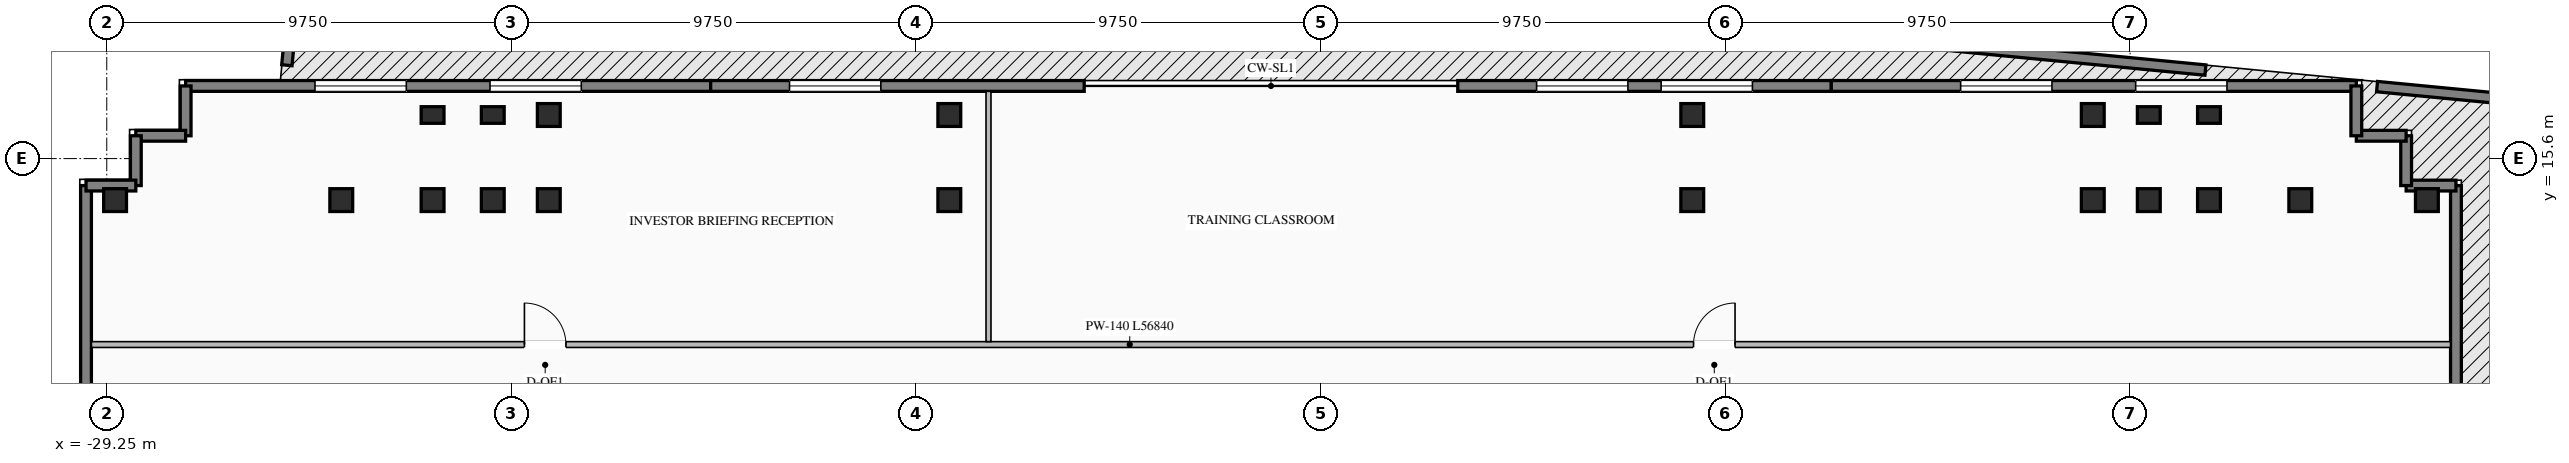
"""IFC4 building model, lengths in metres.
Left out: names, types, materials, properties, quantities, classifications, styles, units other than length and angle.
Written with IfcOpenShell. Run it as: python <this file> out.ifc"""

import sys

from ifc_helpers import new_model, si_unit, direction, frame, frame_2d, origin, origin_2d, place, context, subcontext, project, spatial, rectangle, i_section, extrude, element, fill, save


model = new_model("IFC4")
c1 = context("Model", 3, precision=1e-05, world=origin(), true_north=direction((0.0, 1.0)))
c2 = subcontext(c1, "Body", "Model", "MODEL_VIEW")
j1 = project(units=[si_unit("LENGTHUNIT", "METRE"), si_unit("PLANEANGLEUNIT", "RADIAN")], contexts=[c1])
p1 = place(None, origin())
s1 = spatial("IfcSite", under=j1, at=p1, CompositionType="ELEMENT")
p2 = place(p1, origin())
s2 = spatial("IfcBuilding", under=s1, at=p2, CompositionType="ELEMENT")
p3 = place(p2, frame((0.0, 0.0, 204.3)))
s3 = spatial("IfcBuildingStorey", under=s2, at=p3, CompositionType="ELEMENT", Elevation=204.3)
for number, where, z_axis, x_axis in (
    (1, (-21.4, 14.6, 0.0), (0.0, 0.0, 1.0), (1.0, 0.0, 0.0)),
    (2, (-19.95, 14.6, 0.0), (0.0, 0.0, 1.0), (1.0, 0.0, 0.0)),
    (3, (-18.6, 14.6, 0.0), (0.0, 0.0, 1.0), (1.0, 0.0, 0.0)),
    (4, (-8.95, 14.6, 0.0), (0.0, 0.0, 1.0), (1.0, 0.0, 0.0)),
    (5, (8.95, 14.6, 0.0), (0.0, 0.0, 1.0), (1.0, 0.0, 0.0)),
    (6, (18.6, 14.6, 0.0), (0.0, 0.0, 1.0), (1.0, 0.0, 0.0)),
    (7, (19.95, 14.6, 0.0), (0.0, 0.0, 1.0), (1.0, 0.0, 0.0)),
    (8, (21.4, 14.6, 0.0), (0.0, 0.0, 1.0), (1.0, 0.0, 0.0)),
    (9, (-23.6, 14.6, 0.0), (0.0, 0.0, 1.0), (1.0, 0.0, 0.0)),
    (10, (23.6, 14.6, 0.0), (0.0, 0.0, 1.0), (1.0, 0.0, 0.0)),
):
    element("IfcColumn", number, at=place(p3, frame(where, z_axis=z_axis, x_axis=x_axis)), inside=s3, PredefinedType="COLUMN", context=c2, shape_type="SweptSolid", body=[
        extrude(i_section(OverallWidth=0.55, OverallDepth=0.55, WebThickness=0.024, FlangeThickness=0.036, at=origin_2d()), origin(), (0.0, 0.0, 1.0), 4.2),
    ])
for number, where, z_axis, x_axis in (
    (11, (-18.6, 16.65, -0.28), (0.0, 0.0, 1.0), (1.0, 0.0, 0.0)),
    (12, (-8.95, 16.65, -0.28), (0.0, 0.0, 1.0), (1.0, 0.0, 0.0)),
    (13, (8.95, 16.65, -0.28), (0.0, 0.0, 1.0), (1.0, 0.0, 0.0)),
):
    element("IfcColumn", number, at=place(p3, frame(where, z_axis=z_axis, x_axis=x_axis)), inside=s3, PredefinedType="COLUMN", context=c2, shape_type="SweptSolid", body=[
        extrude(i_section(OverallWidth=0.55, OverallDepth=0.55, WebThickness=0.024, FlangeThickness=0.036, at=origin_2d()), origin(), (0.0, 0.0, 1.0), 4.48),
    ])
p4 = place(p3, frame((18.6, 16.65, 0.0), z_axis=(0.0, 0.0, 1.0), x_axis=(1.0, 0.0, 0.0)))
e14 = element("IfcColumn", 14, at=p4, inside=s3, PredefinedType="COLUMN", context=c2, shape_type="SweptSolid", body=[
    extrude(i_section(OverallWidth=0.55, OverallDepth=0.55, WebThickness=0.024, FlangeThickness=0.036, at=origin_2d()), origin(), (0.0, 0.0, 1.0), 4.2),
])
for number, where, z_axis, x_axis in (
    (15, (-29.05, 14.6, -0.28), (0.0, 0.0, 1.0), (1.0, 0.0, 0.0)),
    (16, (26.65, 14.6, -0.28), (0.0, 0.0, 1.0), (1.0, 0.0, 0.0)),
):
    element("IfcColumn", number, at=place(p3, frame(where, z_axis=z_axis, x_axis=x_axis)), inside=s3, PredefinedType="COLUMN", context=c2, shape_type="SweptSolid", body=[
        extrude(i_section(OverallWidth=0.55, OverallDepth=0.55, WebThickness=0.024, FlangeThickness=0.036, at=origin_2d()), origin(), (0.0, 0.0, 1.0), 4.48),
    ])
for number, where, z_axis, x_axis in (
    (17, (-21.4, 16.65, -0.28), (0.0, 0.0, 1.0), (1.0, 0.0, 0.0)),
    (18, (-19.95, 16.65, -0.28), (0.0, 0.0, 1.0), (1.0, 0.0, 0.0)),
):
    element("IfcColumn", number, at=place(p3, frame(where, z_axis=z_axis, x_axis=x_axis)), inside=s3, PredefinedType="PILASTER", context=c2, shape_type="SweptSolid", body=[
        extrude(rectangle(XDim=0.55, YDim=0.4, at=origin_2d()), origin(), (0.0, 0.0, 1.0), 4.48),
    ])
for number, where, z_axis, x_axis in (
    (19, (19.95, 16.65, 0.0), (0.0, 0.0, 1.0), (1.0, 0.0, 0.0)),
    (20, (21.4, 16.65, 0.0), (0.0, 0.0, 1.0), (1.0, 0.0, 0.0)),
):
    element("IfcColumn", number, at=place(p3, frame(where, z_axis=z_axis, x_axis=x_axis)), inside=s3, PredefinedType="PILASTER", context=c2, shape_type="SweptSolid", body=[
        extrude(rectangle(XDim=0.55, YDim=0.4, at=origin_2d()), origin(), (0.0, 0.0, 1.0), 4.2),
    ])
p5 = place(p3, frame((-27.35, 17.35, 0.0), z_axis=(0.0, 0.0, 1.0), x_axis=(1.0, 0.0, 0.0)))
e21 = element("IfcWall", 21, at=p5, inside=s3, PredefinedType="STANDARD", context=c2, shape_type="SweptSolid", body=[
    extrude(rectangle(XDim=12.65, YDim=0.26, at=frame_2d((6.325, 0.0))), origin(), (0.0, 0.0, 1.0), 4.0),
])
p6 = place(p5, frame((3.117, 0.0, 0.76)))
e22 = element("IfcOpeningElement", 22, at=p6, cuts=e21, PredefinedType="OPENING", context=c2, shape_type="SweptSolid", body=[
    extrude(rectangle(XDim=2.2, YDim=2.25, at=frame_2d((1.1, 1.125))), frame((0.0, 0.14, 0.0), z_axis=(0.0, -1.0, 0.0), x_axis=(1.0, 0.0, 0.0)), (0.0, 0.0, 1.0), 0.28),
])
p7 = place(p5, frame((7.333, 0.0, 0.76)))
e23 = element("IfcOpeningElement", 23, at=p7, cuts=e21, PredefinedType="OPENING", context=c2, shape_type="SweptSolid", body=[
    extrude(rectangle(XDim=2.2, YDim=2.25, at=frame_2d((1.1, 1.125))), frame((0.0, 0.14, 0.0), z_axis=(0.0, -1.0, 0.0), x_axis=(1.0, 0.0, 0.0)), (0.0, 0.0, 1.0), 0.28),
])
p8 = place(p3, frame((-14.7, 17.35, 0.0), z_axis=(0.0, 0.0, 1.0), x_axis=(1.0, 0.0, 0.0)))
e24 = element("IfcWall", 24, at=p8, inside=s3, PredefinedType="STANDARD", context=c2, shape_type="SweptSolid", body=[
    extrude(rectangle(XDim=9.0, YDim=0.26, at=frame_2d((4.5, 0.0))), origin(), (0.0, 0.0, 1.0), 4.0),
])
p9 = place(p8, frame((1.9, 0.0, 0.76)))
e25 = element("IfcOpeningElement", 25, at=p9, cuts=e24, PredefinedType="OPENING", context=c2, shape_type="SweptSolid", body=[
    extrude(rectangle(XDim=2.2, YDim=2.25, at=frame_2d((1.1, 1.125))), frame((0.0, 0.14, 0.0), z_axis=(0.0, -1.0, 0.0), x_axis=(1.0, 0.0, 0.0)), (0.0, 0.0, 1.0), 0.28),
])
p10 = place(p3, frame((3.3, 17.35, 0.0), z_axis=(0.0, 0.0, 1.0), x_axis=(1.0, 0.0, 0.0)))
e26 = element("IfcWall", 26, at=p10, inside=s3, PredefinedType="STANDARD", context=c2, shape_type="SweptSolid", body=[
    extrude(rectangle(XDim=9.0, YDim=0.26, at=frame_2d((4.5, 0.0))), origin(), (0.0, 0.0, 1.0), 4.0),
])
p11 = place(p10, frame((1.9, 0.0, 0.76)))
e27 = element("IfcOpeningElement", 27, at=p11, cuts=e26, PredefinedType="OPENING", context=c2, shape_type="SweptSolid", body=[
    extrude(rectangle(XDim=2.2, YDim=2.25, at=frame_2d((1.1, 1.125))), frame((0.0, 0.14, 0.0), z_axis=(0.0, -1.0, 0.0), x_axis=(1.0, 0.0, 0.0)), (0.0, 0.0, 1.0), 0.28),
])
p12 = place(p10, frame((4.9, 0.0, 0.76)))
e28 = element("IfcOpeningElement", 28, at=p12, cuts=e26, PredefinedType="OPENING", context=c2, shape_type="SweptSolid", body=[
    extrude(rectangle(XDim=2.2, YDim=2.25, at=frame_2d((1.1, 1.125))), frame((0.0, 0.14, 0.0), z_axis=(0.0, -1.0, 0.0), x_axis=(1.0, 0.0, 0.0)), (0.0, 0.0, 1.0), 0.28),
])
p13 = place(p3, frame((12.3, 17.35, 0.0), z_axis=(0.0, 0.0, 1.0), x_axis=(1.0, 0.0, 0.0)))
e29 = element("IfcWall", 29, at=p13, inside=s3, PredefinedType="STANDARD", context=c2, shape_type="SweptSolid", body=[
    extrude(rectangle(XDim=12.65, YDim=0.26, at=frame_2d((6.325, 0.0))), origin(), (0.0, 0.0, 1.0), 4.0),
])
p14 = place(p13, frame((3.117, 0.0, 0.76)))
e30 = element("IfcOpeningElement", 30, at=p14, cuts=e29, PredefinedType="OPENING", context=c2, shape_type="SweptSolid", body=[
    extrude(rectangle(XDim=2.2, YDim=2.25, at=frame_2d((1.1, 1.125))), frame((0.0, 0.14, 0.0), z_axis=(0.0, -1.0, 0.0), x_axis=(1.0, 0.0, 0.0)), (0.0, 0.0, 1.0), 0.28),
])
p15 = place(p13, frame((7.333, 0.0, 0.76)))
e31 = element("IfcOpeningElement", 31, at=p15, cuts=e29, PredefinedType="OPENING", context=c2, shape_type="SweptSolid", body=[
    extrude(rectangle(XDim=2.2, YDim=2.25, at=frame_2d((1.1, 1.125))), frame((0.0, 0.14, 0.0), z_axis=(0.0, -1.0, 0.0), x_axis=(1.0, 0.0, 0.0)), (0.0, 0.0, 1.0), 0.28),
])
p16 = place(p3, frame((-29.75, -0.9, 0.0), z_axis=(0.0, 0.0, 1.0), x_axis=(0.0, 1.0, 0.0)))
e32 = element("IfcWall", 32, at=p16, inside=s3, PredefinedType="STANDARD", context=c2, shape_type="SweptSolid", body=[
    extrude(rectangle(XDim=15.85, YDim=0.26, at=frame_2d((7.925, 0.0))), origin(), (0.0, 0.0, 1.0), 4.0),
])
p17 = place(p16, frame((4.283, 0.0, 0.76)))
e33 = element("IfcOpeningElement", 33, at=p17, cuts=e32, PredefinedType="OPENING", context=c2, shape_type="SweptSolid", body=[
    extrude(rectangle(XDim=2.0, YDim=2.05, at=frame_2d((1.0, 1.025))), frame((0.0, 0.14, 0.0), z_axis=(0.0, -1.0, 0.0), x_axis=(1.0, 0.0, 0.0)), (0.0, 0.0, 1.0), 0.28),
])
p18 = place(p3, frame((27.35, 14.95, 0.0), z_axis=(0.0, 0.0, 1.0), x_axis=(0.0, -1.0, 0.0)))
e34 = element("IfcWall", 34, at=p18, inside=s3, PredefinedType="STANDARD", context=c2, shape_type="SweptSolid", body=[
    extrude(rectangle(XDim=15.85, YDim=0.26, at=frame_2d((7.925, 0.0))), origin(), (0.0, 0.0, 1.0), 4.0),
])
p19 = place(p18, frame((9.567, 0.0, 0.76)))
e35 = element("IfcOpeningElement", 35, at=p19, cuts=e34, PredefinedType="OPENING", context=c2, shape_type="SweptSolid", body=[
    extrude(rectangle(XDim=2.0, YDim=2.05, at=frame_2d((1.0, 1.025))), frame((0.0, 0.14, 0.0), z_axis=(0.0, -1.0, 0.0), x_axis=(1.0, 0.0, 0.0)), (0.0, 0.0, 1.0), 0.28),
])
p20 = place(p3, frame((27.35, 14.95, 0.0), z_axis=(0.0, 0.0, 1.0), x_axis=(-1.0, 0.0, 0.0)))
e36 = element("IfcWall", 36, at=p20, inside=s3, PredefinedType="STANDARD", context=c2, shape_type="SweptSolid", body=[
    extrude(rectangle(XDim=1.2, YDim=0.26, at=frame_2d((0.6, 0.0))), origin(), (0.0, 0.0, 1.0), 2.195),
])
for number, where, z_axis, x_axis in (
    (37, (26.15, 14.95, 0.0), (0.0, 0.0, 1.0), (0.0, 1.0, 0.0)),
    (38, (26.15, 16.15, 0.0), (0.0, 0.0, 1.0), (-1.0, 0.0, 0.0)),
):
    element("IfcWall", number, at=place(p3, frame(where, z_axis=z_axis, x_axis=x_axis)), inside=s3, PredefinedType="STANDARD", context=c2, shape_type="SweptSolid", body=[
        extrude(rectangle(XDim=1.2, YDim=0.26, at=frame_2d((0.6, 0.0))), origin(), (0.0, 0.0, 1.0), 2.195),
    ])
for number, where, z_axis, x_axis in (
    (39, (24.95, 16.15, 0.0), (0.0, 0.0, 1.0), (0.0, 1.0, 0.0)),
    (40, (-27.35, 17.35, 0.0), (0.0, 0.0, 1.0), (0.0, -1.0, 0.0)),
):
    element("IfcWall", number, at=place(p3, frame(where, z_axis=z_axis, x_axis=x_axis)), inside=s3, PredefinedType="STANDARD", context=c2, shape_type="SweptSolid", body=[
        extrude(rectangle(XDim=1.2, YDim=0.26, at=frame_2d((0.6, 0.0))), origin(), (0.0, 0.0, 1.0), 2.195),
    ])
for number, where, z_axis, x_axis in (
    (41, (-27.35, 16.15, 0.0), (0.0, 0.0, 1.0), (-1.0, 0.0, 0.0)),
    (42, (-28.55, 16.15, 0.0), (0.0, 0.0, 1.0), (0.0, -1.0, 0.0)),
    (43, (-28.55, 14.95, 0.0), (0.0, 0.0, 1.0), (-1.0, 0.0, 0.0)),
):
    element("IfcWall", number, at=place(p3, frame(where, z_axis=z_axis, x_axis=x_axis)), inside=s3, PredefinedType="STANDARD", context=c2, shape_type="SweptSolid", body=[
        extrude(rectangle(XDim=1.2, YDim=0.26, at=frame_2d((0.6, 0.0))), origin(), (0.0, 0.0, 1.0), 2.195),
    ])
p21 = place(p3, frame((-21.979, 21.901, 0.0), z_axis=(0.0, 0.0, 1.0), x_axis=(0.99539621615, -0.095845567841, 0.0)))
e44 = element("IfcWall", 44, at=p21, inside=s3, PredefinedType="PARAPET", context=c2, shape_type="SweptSolid", body=[
    extrude(rectangle(XDim=43.494, YDim=0.25, at=frame_2d((21.747, 0.0))), origin(), (0.0, 0.0, 1.0), 1.2),
])
p22 = place(p3, frame((-24.911, 17.849, 0.0), z_axis=(0.0, 0.0, 1.0), x_axis=(0.095777585134, 0.995402759784, 0.0)))
e45 = element("IfcWall", 45, at=p22, inside=s3, PredefinedType="PARAPET", context=c2, shape_type="SweptSolid", body=[
    extrude(rectangle(XDim=1.784, YDim=0.25, at=frame_2d((0.892, 0.0))), origin(), (0.0, 0.0, 1.0), 1.2),
])
p23 = place(p3, frame((25.449, 17.334, 0.0), z_axis=(0.0, 0.0, 1.0), x_axis=(0.995397970868, -0.095827342607, 0.0)))
e46 = element("IfcWall", 46, at=p23, inside=s3, PredefinedType="PARAPET", context=c2, shape_type="SweptSolid", body=[
    extrude(rectangle(XDim=7.852, YDim=0.25, at=frame_2d((3.926, 0.0))), origin(), (0.0, 0.0, 1.0), 1.2),
])
p24 = place(p3, frame((-29.62, 11.12, 0.0), z_axis=(0.0, 0.0, 1.0), x_axis=(1.0, 0.0, 0.0)))
e47 = element("IfcWall", 47, at=p24, inside=s3, PredefinedType="STANDARD", context=c2, shape_type="SweptSolid", body=[
    extrude(rectangle(XDim=56.84, YDim=0.14, at=frame_2d((28.42, 0.0))), origin(), (0.0, 0.0, 1.0), 4.0),
])
p25 = place(p24, frame((10.433, 0.0, 0.0)))
e48 = element("IfcOpeningElement", 48, at=p25, cuts=e47, PredefinedType="OPENING", context=c2, shape_type="SweptSolid", body=[
    extrude(rectangle(XDim=1.0, YDim=2.08, at=frame_2d((0.5, 1.04))), frame((0.0, 0.08, 0.0), z_axis=(0.0, -1.0, 0.0), x_axis=(1.0, 0.0, 0.0)), (0.0, 0.0, 1.0), 0.16),
])
p26 = place(p24, frame((38.601, 0.0, 0.0)))
e49 = element("IfcOpeningElement", 49, at=p26, cuts=e47, PredefinedType="OPENING", context=c2, shape_type="SweptSolid", body=[
    extrude(rectangle(XDim=1.0, YDim=2.08, at=frame_2d((0.5, 1.04))), frame((0.0, 0.08, 0.0), z_axis=(0.0, -1.0, 0.0), x_axis=(1.0, 0.0, 0.0)), (0.0, 0.0, 1.0), 0.16),
])
p27 = place(p3, frame((-8.006, 11.19, 0.0), z_axis=(0.0, 0.0, 1.0), x_axis=(0.0, 1.0, 0.0)))
e50 = element("IfcWall", 50, at=p27, inside=s3, PredefinedType="STANDARD", context=c2, shape_type="SweptSolid", body=[
    extrude(rectangle(XDim=6.03, YDim=0.12, at=frame_2d((3.015, 0.0))), origin(), (0.0, 0.0, 1.0), 4.0),
])
p28 = place(p6, origin())
e51 = element("IfcWindow", 51, at=p28, inside=s3, PartitioningType="DOUBLE_PANEL_VERTICAL", PredefinedType="WINDOW", context=c2, shape_type="SweptSolid", body=[
    extrude(rectangle(XDim=2.2, YDim=2.25, at=frame_2d((1.1, 1.125))), frame((0.0, 0.03, 0.0), z_axis=(0.0, -1.0, 0.0), x_axis=(1.0, 0.0, 0.0)), (0.0, 0.0, 1.0), 0.06),
])
fill(e22, e51)
p29 = place(p7, origin())
e52 = element("IfcWindow", 52, at=p29, inside=s3, PartitioningType="DOUBLE_PANEL_VERTICAL", PredefinedType="WINDOW", context=c2, shape_type="SweptSolid", body=[
    extrude(rectangle(XDim=2.2, YDim=2.25, at=frame_2d((1.1, 1.125))), frame((0.0, 0.03, 0.0), z_axis=(0.0, -1.0, 0.0), x_axis=(1.0, 0.0, 0.0)), (0.0, 0.0, 1.0), 0.06),
])
fill(e23, e52)
p30 = place(p9, origin())
e53 = element("IfcWindow", 53, at=p30, inside=s3, PartitioningType="DOUBLE_PANEL_VERTICAL", PredefinedType="WINDOW", context=c2, shape_type="SweptSolid", body=[
    extrude(rectangle(XDim=2.2, YDim=2.25, at=frame_2d((1.1, 1.125))), frame((0.0, 0.03, 0.0), z_axis=(0.0, -1.0, 0.0), x_axis=(1.0, 0.0, 0.0)), (0.0, 0.0, 1.0), 0.06),
])
fill(e25, e53)
p31 = place(p11, origin())
e54 = element("IfcWindow", 54, at=p31, inside=s3, PartitioningType="DOUBLE_PANEL_VERTICAL", PredefinedType="WINDOW", context=c2, shape_type="SweptSolid", body=[
    extrude(rectangle(XDim=2.2, YDim=2.25, at=frame_2d((1.1, 1.125))), frame((0.0, 0.03, 0.0), z_axis=(0.0, -1.0, 0.0), x_axis=(1.0, 0.0, 0.0)), (0.0, 0.0, 1.0), 0.06),
])
fill(e27, e54)
p32 = place(p12, origin())
e55 = element("IfcWindow", 55, at=p32, inside=s3, PartitioningType="DOUBLE_PANEL_VERTICAL", PredefinedType="WINDOW", context=c2, shape_type="SweptSolid", body=[
    extrude(rectangle(XDim=2.2, YDim=2.25, at=frame_2d((1.1, 1.125))), frame((0.0, 0.03, 0.0), z_axis=(0.0, -1.0, 0.0), x_axis=(1.0, 0.0, 0.0)), (0.0, 0.0, 1.0), 0.06),
])
fill(e28, e55)
p33 = place(p14, origin())
e56 = element("IfcWindow", 56, at=p33, inside=s3, PartitioningType="DOUBLE_PANEL_VERTICAL", PredefinedType="WINDOW", context=c2, shape_type="SweptSolid", body=[
    extrude(rectangle(XDim=2.2, YDim=2.25, at=frame_2d((1.1, 1.125))), frame((0.0, 0.03, 0.0), z_axis=(0.0, -1.0, 0.0), x_axis=(1.0, 0.0, 0.0)), (0.0, 0.0, 1.0), 0.06),
])
fill(e30, e56)
p34 = place(p15, origin())
e57 = element("IfcWindow", 57, at=p34, inside=s3, PartitioningType="DOUBLE_PANEL_VERTICAL", PredefinedType="WINDOW", context=c2, shape_type="SweptSolid", body=[
    extrude(rectangle(XDim=2.2, YDim=2.25, at=frame_2d((1.1, 1.125))), frame((0.0, 0.03, 0.0), z_axis=(0.0, -1.0, 0.0), x_axis=(1.0, 0.0, 0.0)), (0.0, 0.0, 1.0), 0.06),
])
fill(e31, e57)
p35 = place(p25, origin())
e58 = element("IfcDoor", 58, at=p35, inside=s3, OperationType="SINGLE_SWING_LEFT", PredefinedType="DOOR", context=c2, shape_type="SweptSolid", body=[
    extrude(rectangle(XDim=1.0, YDim=2.08, at=frame_2d((0.5, 1.04))), frame((0.0, 0.025, 0.0), z_axis=(0.0, -1.0, 0.0), x_axis=(1.0, 0.0, 0.0)), (0.0, 0.0, 1.0), 0.05),
])
fill(e48, e58)
p36 = place(p26, origin())
e59 = element("IfcDoor", 59, at=p36, inside=s3, OperationType="SINGLE_SWING_RIGHT", PredefinedType="DOOR", context=c2, shape_type="SweptSolid", body=[
    extrude(rectangle(XDim=1.0, YDim=2.08, at=frame_2d((0.5, 1.04))), frame((0.0, 0.025, 0.0), z_axis=(0.0, -1.0, 0.0), x_axis=(1.0, 0.0, 0.0)), (0.0, 0.0, 1.0), 0.05),
])
fill(e49, e59)
save(model, sys.argv[1])
